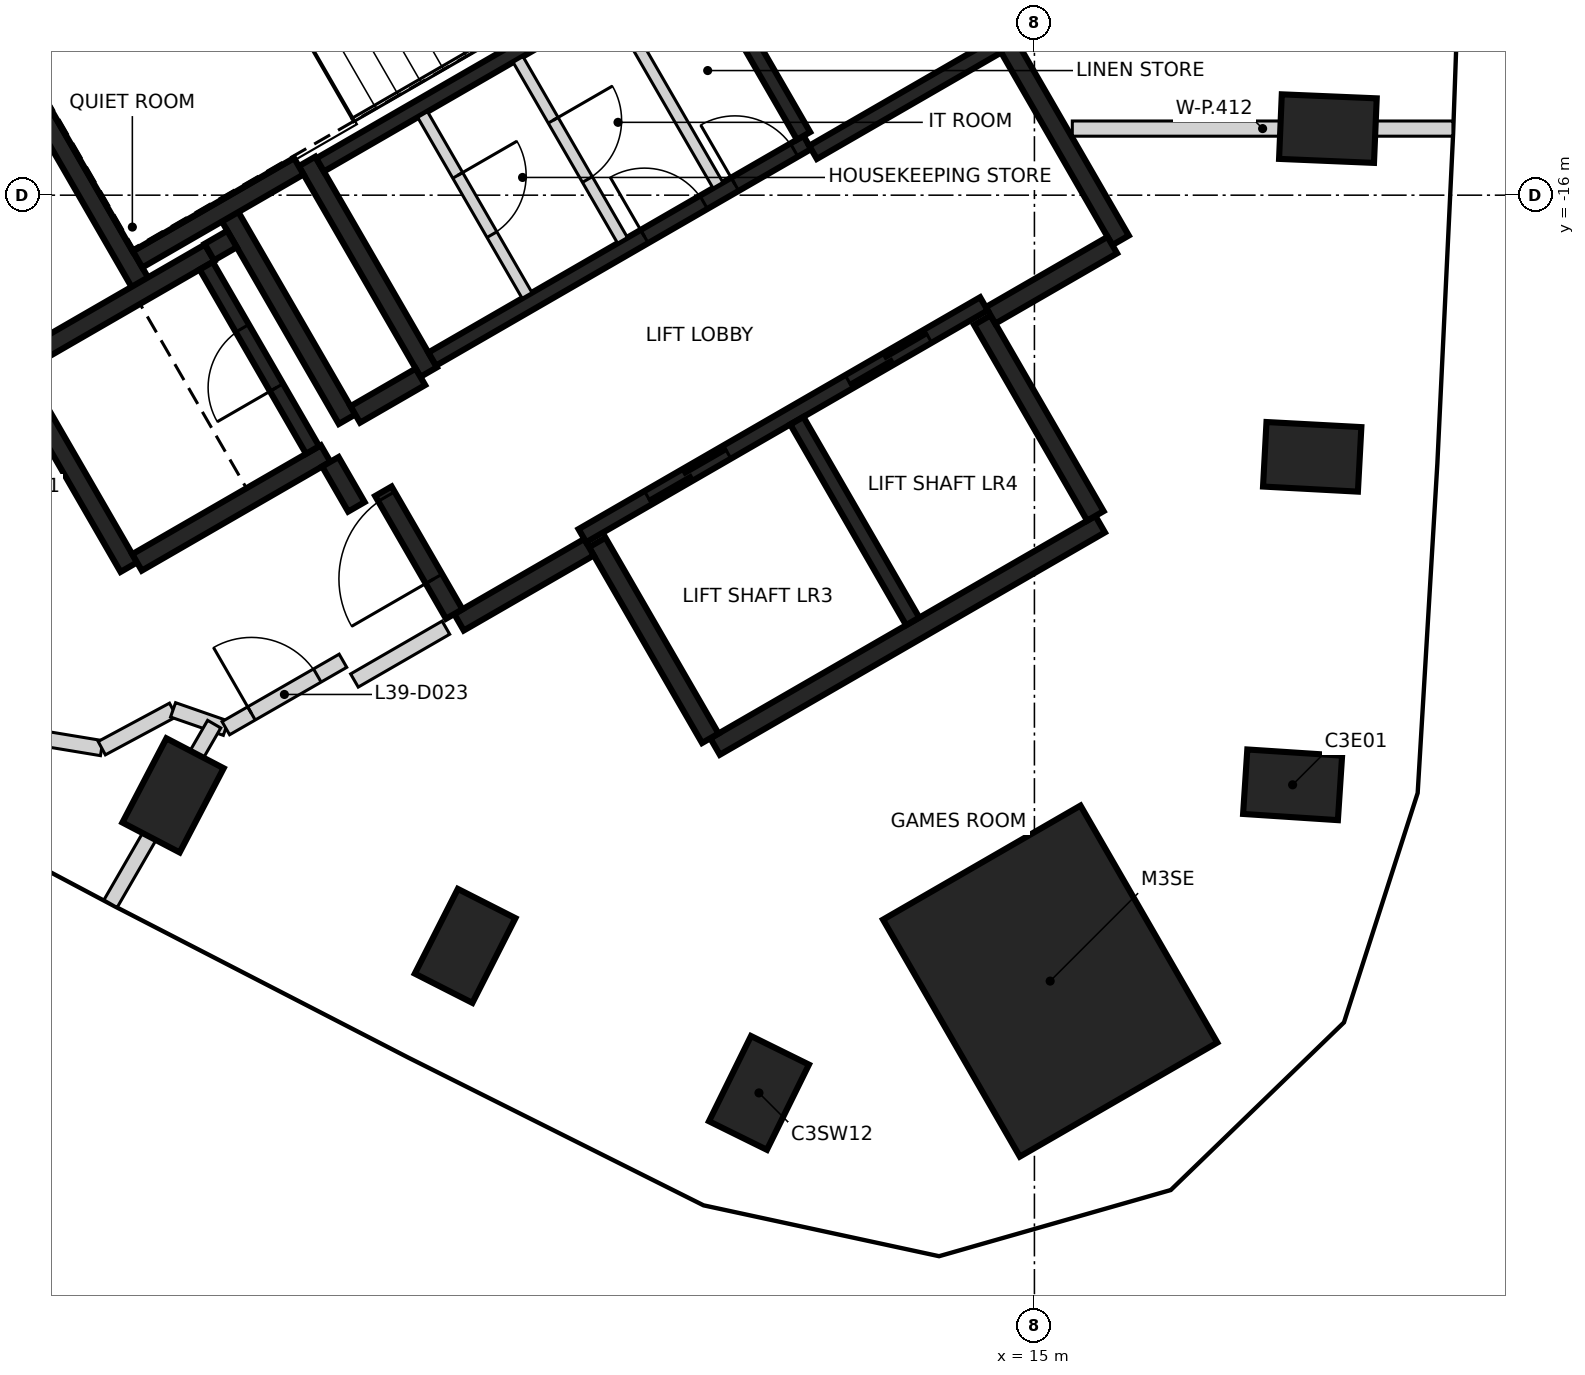
"""IFC4 building model, lengths in metres.
Left out: names, types, materials, properties, quantities, classifications, styles, units other than length and angle.
Written with IfcOpenShell. Run it as: python <this file> out.ifc"""

import sys

from ifc_helpers import new_model, si_unit, direction, frame, frame_2d, origin, origin_2d, place, context, subcontext, project, spatial, rectangle, extrude, element, fill, save


model = new_model("IFC4")
c1 = context("Model", 3, precision=1e-05, world=origin(), true_north=direction((0.0, 1.0)))
c2 = subcontext(c1, "Body", "Model", "MODEL_VIEW")
j1 = project(units=[si_unit("LENGTHUNIT", "METRE"), si_unit("PLANEANGLEUNIT", "RADIAN")], contexts=[c1])
p1 = place(None, origin())
s1 = spatial("IfcSite", under=j1, at=p1, CompositionType="ELEMENT")
p2 = place(p1, origin())
s2 = spatial("IfcBuilding", under=s1, at=p2, CompositionType="ELEMENT")
p3 = place(p2, frame((0.0, 0.0, 157.6)))
s3 = spatial("IfcBuildingStorey", under=s2, at=p3, CompositionType="ELEMENT", Elevation=157.6)
for number, where, z_axis, x_axis in (
    (1, (18.397, -23.757, -0.4), (0.0, 0.0, 1.0), (-0.998, 0.065, 0.0)),
    (2, (18.655, -19.442, -0.4), (0.0, 0.0, 1.0), (-0.999, 0.054, 0.0)),
    (3, (18.861, -15.124, -0.4), (0.0, 0.0, 1.0), (-0.999, 0.042, 0.0)),
    (4, (3.667, -23.896, -0.4), (0.0, 0.0, 1.0), (0.463, 0.886, 0.0)),
    (5, (7.51, -25.876, -0.4), (0.0, 0.0, 1.0), (0.453, 0.892, 0.0)),
    (6, (11.376, -27.811, -0.4), (0.0, 0.0, 1.0), (0.442, 0.897, 0.0)),
):
    element("IfcColumn", number, at=place(p3, frame(where, z_axis=z_axis, x_axis=x_axis)), inside=s3, PredefinedType="COLUMN", context=c2, shape_type="SweptSolid", body=[
        extrude(rectangle(XDim=1.25, YDim=0.85, at=origin_2d()), origin(), (0.0, 0.0, 1.0), 3.6),
    ])
p4 = place(p3, frame((15.207, -26.34, -0.4), z_axis=(0.0, 0.0, 1.0), x_axis=(-0.5, 0.866025403784, 0.0)))
e7 = element("IfcColumn", 7, at=p4, inside=s3, PredefinedType="COLUMN", context=c2, shape_type="SweptSolid", body=[
    extrude(rectangle(XDim=3.6, YDim=3.0, at=origin_2d()), origin(), (0.0, 0.0, 1.0), 3.6),
])
p5 = place(p3, frame((13.008, -11.181, 0.0), z_axis=(0.0, 0.0, 1.0), x_axis=(0.500004234368, -0.866022959057, 0.0)))
e8 = element("IfcWall", 8, at=p5, inside=s3, PredefinedType="SHEAR", context=c2, shape_type="SweptSolid", body=[
    extrude(rectangle(XDim=6.25, YDim=0.25, at=frame_2d((3.125, 0.0))), origin(), (0.0, 0.0, 1.0), 3.2),
])
p6 = place(p3, frame((15.865, -20.328, 0.0), z_axis=(0.0, 0.0, 1.0), x_axis=(-0.86602852612, -0.499994591916, 0.0)))
e9 = element("IfcWall", 9, at=p6, inside=s3, PredefinedType="SHEAR", context=c2, shape_type="SweptSolid", body=[
    extrude(rectangle(XDim=5.85, YDim=0.25, at=frame_2d((2.925, 0.0))), origin(), (0.0, 0.0, 1.0), 3.2),
])
p7 = place(p3, frame((3.235, -17.153, 0.0), z_axis=(0.0, 0.0, 1.0), x_axis=(-0.500008851346, 0.866020293397, 0.0)))
e10 = element("IfcWall", 10, at=p7, inside=s3, PredefinedType="SHEAR", context=c2, shape_type="SweptSolid", body=[
    extrude(rectangle(XDim=5.51, YDim=0.25, at=frame_2d((2.755, 0.0))), origin(), (0.0, 0.0, 1.0), 3.2),
])
p8 = place(p3, frame((7.031, -18.327, 0.0), z_axis=(0.0, 0.0, 1.0), x_axis=(-0.499971222258, 0.866042017984, 0.0)))
e11 = element("IfcWall", 11, at=p8, inside=s3, PredefinedType="SHEAR", context=c2, shape_type="SweptSolid", body=[
    extrude(rectangle(XDim=3.2, YDim=0.25, at=frame_2d((1.6, 0.0))), origin(), (0.0, 0.0, 1.0), 3.2),
])
for number, where, z_axis, x_axis in (
    (12, (14.315, -17.644, 0.0), (0.0, 0.0, 1.0), (0.5, -0.866, 0.0)),
    (13, (10.736, -23.145, 0.0), (0.0, 0.0, 1.0), (-0.5, 0.866, 0.0)),
):
    element("IfcWall", number, at=place(p3, frame(where, z_axis=z_axis, x_axis=x_axis)), inside=s3, PredefinedType="SHEAR", context=c2, shape_type="SweptSolid", body=[
        extrude(rectangle(XDim=2.974, YDim=0.25, at=frame_2d((1.487, 0.0))), origin(), (0.0, 0.0, 1.0), 3.2),
    ])
p9 = place(p3, frame((3.085, -20.894, 0.0), z_axis=(0.0, 0.0, 1.0), x_axis=(-0.499978833458, 0.866037623948, 0.0)))
e14 = element("IfcWall", 14, at=p9, inside=s3, PredefinedType="SHEAR", context=c2, shape_type="SweptSolid", body=[
    extrude(rectangle(XDim=3.05, YDim=0.25, at=frame_2d((1.525, 0.0))), origin(), (0.0, 0.0, 1.0), 3.2),
])
p10 = place(p3, frame((1.669, -18.19, 0.0), z_axis=(0.0, 0.0, 1.0), x_axis=(0.866042235819, 0.499970844928, 0.0)))
e15 = element("IfcWall", 15, at=p10, inside=s3, PredefinedType="SHEAR", context=c2, shape_type="SweptSolid", body=[
    extrude(rectangle(XDim=2.865, YDim=0.25, at=frame_2d((1.432, 0.0))), origin(), (0.0, 0.0, 1.0), 3.2),
])
p11 = place(p3, frame((5.675, -19.399, 0.0), z_axis=(0.0, 0.0, 1.0), x_axis=(-0.866026637627, -0.499997862916, 0.0)))
e16 = element("IfcWall", 16, at=p11, inside=s3, PredefinedType="SHEAR", context=c2, shape_type="SweptSolid", body=[
    extrude(rectangle(XDim=2.865, YDim=0.25, at=frame_2d((1.432, 0.0))), origin(), (0.0, 0.0, 1.0), 3.2),
])
p12 = place(p3, frame((4.414, -16.276, 0.0), z_axis=(0.0, 0.0, 1.0), x_axis=(0.500003324108, -0.866023484601, 0.0)))
e17 = element("IfcWall", 17, at=p12, inside=s3, PredefinedType="SHEAR", context=c2, shape_type="SweptSolid", body=[
    extrude(rectangle(XDim=3.085, YDim=0.25, at=frame_2d((1.542, 0.0))), origin(), (0.0, 0.0, 1.0), 3.2),
])
p13 = place(p3, frame((5.322, -15.619, 0.0), z_axis=(0.0, 0.0, 1.0), x_axis=(-0.866026229868, -0.499998569178, 0.0)))
e18 = element("IfcWall", 18, at=p13, inside=s3, PredefinedType="SHEAR", context=c2, shape_type="SweptSolid", body=[
    extrude(rectangle(XDim=2.449, YDim=0.25, at=frame_2d((1.225, 0.0))), origin(), (0.0, 0.0, 1.0), 3.2),
])
p14 = place(p3, frame((9.14, -20.631, 0.0), z_axis=(0.0, 0.0, 1.0), x_axis=(-0.866043531843, -0.499968599967, 0.0)))
e19 = element("IfcWall", 19, at=p14, inside=s3, PredefinedType="SHEAR", context=c2, shape_type="SweptSolid", body=[
    extrude(rectangle(XDim=1.975, YDim=0.25, at=frame_2d((0.987, 0.0))), origin(), (0.0, 0.0, 1.0), 3.2),
])
p15 = place(p3, frame((16.025, -16.656, 0.0), z_axis=(0.0, 0.0, 1.0), x_axis=(-0.866016279763, -0.500015802937, 0.0)))
e20 = element("IfcWall", 20, at=p15, inside=s3, PredefinedType="SHEAR", context=c2, shape_type="SweptSolid", body=[
    extrude(rectangle(XDim=1.849, YDim=0.25, at=frame_2d((0.925, 0.0))), origin(), (0.0, 0.0, 1.0), 3.2),
])
p16 = place(p3, frame((7.367, -21.51, 0.0), z_axis=(0.0, 0.0, 1.0), x_axis=(-0.499983108224, 0.866035156036, 0.0)))
e21 = element("IfcWall", 21, at=p16, inside=s3, PredefinedType="SHEAR", context=c2, shape_type="SweptSolid", body=[
    extrude(rectangle(XDim=1.865, YDim=0.25, at=frame_2d((0.932, 0.0))), origin(), (0.0, 0.0, 1.0), 3.2),
])
p17 = place(p16, frame((0.535, 0.0, 0.0)))
e22 = element("IfcOpeningElement", 22, at=p17, cuts=e21, PredefinedType="OPENING", context=c2, shape_type="SweptSolid", body=[
    extrude(rectangle(XDim=1.25, YDim=2.1, at=frame_2d((0.625, 1.05))), frame((0.0, 0.135, 0.0), z_axis=(0.0, -1.0, 0.0), x_axis=(1.0, 0.0, 0.0)), (0.0, 0.0, 1.0), 0.27),
])
p18 = place(p3, frame((6.065, -18.885, 0.0), z_axis=(0.0, 0.0, 1.0), x_axis=(0.866017078145, 0.500014420154, 0.0)))
e23 = element("IfcWall", 23, at=p18, inside=s3, PredefinedType="SHEAR", context=c2, shape_type="SweptSolid", body=[
    extrude(rectangle(XDim=0.989, YDim=0.25, at=frame_2d((0.495, 0.0))), origin(), (0.0, 0.0, 1.0), 3.2),
])
p19 = place(p3, frame((6.08, -20.1, 0.0), z_axis=(0.0, 0.0, 1.0), x_axis=(-0.500051773299, 0.865995510393, 0.0)))
e24 = element("IfcWall", 24, at=p19, inside=s3, PredefinedType="SHEAR", context=c2, shape_type="SweptSolid", body=[
    extrude(rectangle(XDim=0.685, YDim=0.25, at=frame_2d((0.342, 0.0))), origin(), (0.0, 0.0, 1.0), 3.2),
])
p20 = place(p3, frame((4.145, -16.749, 0.0), z_axis=(0.0, 0.0, 1.0), x_axis=(0.866185586049, 0.49972245349, 0.0)))
e25 = element("IfcWall", 25, at=p20, inside=s3, PredefinedType="SHEAR", context=c2, shape_type="SweptSolid", body=[
    extrude(rectangle(XDim=0.344, YDim=0.25, at=frame_2d((0.172, 0.0))), origin(), (0.0, 0.0, 1.0), 3.2),
])
p21 = place(p3, frame((9.052, -20.48, 0.0), z_axis=(0.0, 0.0, 1.0), x_axis=(0.866030299012, 0.499991521122, 0.0)))
e26 = element("IfcWall", 26, at=p21, inside=s3, PredefinedType="SHEAR", context=c2, shape_type="SweptSolid", body=[
    extrude(rectangle(XDim=6.1, YDim=0.2, at=frame_2d((3.05, 0.0))), origin(), (0.0, 0.0, 1.0), 3.2),
])
p22 = place(p21, frame((1.0, 0.0, 0.0)))
e27 = element("IfcOpeningElement", 27, at=p22, cuts=e26, PredefinedType="OPENING", context=c2, shape_type="SweptSolid", body=[
    extrude(rectangle(XDim=1.2, YDim=2.1, at=frame_2d((0.6, 1.05))), frame((0.0, 0.11, 0.0), z_axis=(0.0, -1.0, 0.0), x_axis=(1.0, 0.0, 0.0)), (0.0, 0.0, 1.0), 0.22),
])
p23 = place(p21, frame((4.05, 0.0, 0.0)))
e28 = element("IfcOpeningElement", 28, at=p23, cuts=e26, PredefinedType="OPENING", context=c2, shape_type="SweptSolid", body=[
    extrude(rectangle(XDim=1.2, YDim=2.1, at=frame_2d((0.6, 1.05))), frame((0.0, 0.11, 0.0), z_axis=(0.0, -1.0, 0.0), x_axis=(1.0, 0.0, 0.0)), (0.0, 0.0, 1.0), 0.22),
])
p24 = place(p3, frame((10.538, -12.752, 0.0), z_axis=(0.0, 0.0, 1.0), x_axis=(-0.866038630372, -0.499977090179, 0.0)))
e29 = element("IfcWall", 29, at=p24, inside=s3, PredefinedType="SHEAR", context=c2, shape_type="SweptSolid", body=[
    extrude(rectangle(XDim=5.699, YDim=0.2, at=frame_2d((2.85, 0.0))), origin(), (0.0, 0.0, 1.0), 3.2),
])
p25 = place(p3, frame((7.077, -18.156, 0.0), z_axis=(0.0, 0.0, 1.0), x_axis=(0.866038630372, 0.499977090179, 0.0)))
e30 = element("IfcWall", 30, at=p25, inside=s3, PredefinedType="SHEAR", context=c2, shape_type="SweptSolid", body=[
    extrude(rectangle(XDim=5.699, YDim=0.2, at=frame_2d((2.85, 0.0))), origin(), (0.0, 0.0, 1.0), 3.2),
])
p26 = place(p25, frame((3.224, 0.0, 0.0)))
e31 = element("IfcOpeningElement", 31, at=p26, cuts=e30, PredefinedType="OPENING", context=c2, shape_type="SweptSolid", body=[
    extrude(rectangle(XDim=0.9, YDim=2.1, at=frame_2d((0.45, 1.05))), frame((0.0, 0.11, 0.0), z_axis=(0.0, -1.0, 0.0), x_axis=(1.0, 0.0, 0.0)), (0.0, 0.0, 1.0), 0.22),
])
p27 = place(p25, frame((4.599, 0.0, 0.0)))
e32 = element("IfcOpeningElement", 32, at=p27, cuts=e30, PredefinedType="OPENING", context=c2, shape_type="SweptSolid", body=[
    extrude(rectangle(XDim=0.9, YDim=2.1, at=frame_2d((0.45, 1.05))), frame((0.0, 0.11, 0.0), z_axis=(0.0, -1.0, 0.0), x_axis=(1.0, 0.0, 0.0)), (0.0, 0.0, 1.0), 0.22),
])
p28 = place(p3, frame((11.875, -18.967, 0.0), z_axis=(0.0, 0.0, 1.0), x_axis=(0.49998131003, -0.866036194175, 0.0)))
e33 = element("IfcWall", 33, at=p28, inside=s3, PredefinedType="SHEAR", context=c2, shape_type="SweptSolid", body=[
    extrude(rectangle(XDim=3.048, YDim=0.2, at=frame_2d((1.524, 0.0))), origin(), (0.0, 0.0, 1.0), 3.2),
])
p29 = place(p3, frame((5.503, -19.352, 0.0), z_axis=(0.0, 0.0, 1.0), x_axis=(-0.499986818241, 0.866033014143, 0.0)))
e34 = element("IfcWall", 34, at=p29, inside=s3, PredefinedType="SHEAR", context=c2, shape_type="SweptSolid", body=[
    extrude(rectangle(XDim=2.798, YDim=0.2, at=frame_2d((1.399, 0.0))), origin(), (0.0, 0.0, 1.0), 3.2),
])
p30 = place(p29, frame((0.949, 0.0, 0.0)))
e35 = element("IfcOpeningElement", 35, at=p30, cuts=e34, PredefinedType="OPENING", context=c2, shape_type="SweptSolid", body=[
    extrude(rectangle(XDim=0.9, YDim=2.1, at=frame_2d((0.45, 1.05))), frame((0.0, 0.11, 0.0), z_axis=(0.0, -1.0, 0.0), x_axis=(1.0, 0.0, 0.0)), (0.0, 0.0, 1.0), 0.22),
])
p31 = place(p3, frame((11.963, -15.22, 0.0), z_axis=(0.0, 0.0, 1.0), x_axis=(-0.500034990121, 0.866005201286, 0.0)))
e36 = element("IfcWall", 36, at=p31, inside=s3, PredefinedType="SHEAR", context=c2, shape_type="SweptSolid", body=[
    extrude(rectangle(XDim=2.75, YDim=0.2, at=frame_2d((1.375, 0.0))), origin(), (0.0, 0.0, 1.0), 3.2),
])
p32 = place(p3, frame((14.512, -14.037, 0.0), z_axis=(0.0, 0.0, 1.0), x_axis=(-0.866044696403, -0.499966582715, 0.0)))
e37 = element("IfcWall", 37, at=p32, inside=s3, PredefinedType="SHEAR", context=c2, shape_type="SweptSolid", body=[
    extrude(rectangle(XDim=2.799, YDim=0.2, at=frame_2d((1.399, 0.0))), origin(), (0.0, 0.0, 1.0), 3.2),
])
p33 = place(p3, frame((8.207, -14.214, 0.0), z_axis=(0.0, 0.0, 1.0), x_axis=(0.50002746344, -0.86600954718, 0.0)))
e38 = element("IfcWall", 38, at=p33, inside=s3, PredefinedType="PARTITIONING", context=c2, shape_type="SweptSolid", body=[
    extrude(rectangle(XDim=2.748, YDim=0.15, at=frame_2d((1.374, 0.0))), origin(), (0.0, 0.0, 1.0), 3.2),
])
p34 = place(p33, frame((0.924, 0.0, 0.0)))
e39 = element("IfcOpeningElement", 39, at=p34, cuts=e38, PredefinedType="OPENING", context=c2, shape_type="SweptSolid", body=[
    extrude(rectangle(XDim=0.9, YDim=2.1, at=frame_2d((0.45, 1.05))), frame((0.0, 0.085, 0.0), z_axis=(0.0, -1.0, 0.0), x_axis=(1.0, 0.0, 0.0)), (0.0, 0.0, 1.0), 0.17),
])
p35 = place(p3, frame((9.462, -13.489, 0.0), z_axis=(0.0, 0.0, 1.0), x_axis=(0.499988999718, -0.866031754707, 0.0)))
e40 = element("IfcWall", 40, at=p35, inside=s3, PredefinedType="PARTITIONING", context=c2, shape_type="SweptSolid", body=[
    extrude(rectangle(XDim=2.749, YDim=0.15, at=frame_2d((1.374, 0.0))), origin(), (0.0, 0.0, 1.0), 3.2),
])
p36 = place(p3, frame((6.951, -14.939, 0.0), z_axis=(0.0, 0.0, 1.0), x_axis=(0.499988999718, -0.866031754707, 0.0)))
e41 = element("IfcWall", 41, at=p36, inside=s3, PredefinedType="PARTITIONING", context=c2, shape_type="SweptSolid", body=[
    extrude(rectangle(XDim=2.749, YDim=0.15, at=frame_2d((1.374, 0.0))), origin(), (0.0, 0.0, 1.0), 3.2),
])
p37 = place(p36, frame((0.924, 0.0, 0.0)))
e42 = element("IfcOpeningElement", 42, at=p37, cuts=e41, PredefinedType="OPENING", context=c2, shape_type="SweptSolid", body=[
    extrude(rectangle(XDim=0.9, YDim=2.1, at=frame_2d((0.45, 1.05))), frame((0.0, 0.085, 0.0), z_axis=(0.0, -1.0, 0.0), x_axis=(1.0, 0.0, 0.0)), (0.0, 0.0, 1.0), 0.17),
])
p38 = place(p3, frame((1.584, -23.086, 0.0), z_axis=(0.0, 0.0, 1.0), x_axis=(0.986654221629, -0.162829502674, 0.0)))
e43 = element("IfcWall", 43, at=p38, inside=s3, PredefinedType="PARTITIONING", context=c2, shape_type="SweptSolid", body=[
    extrude(rectangle(XDim=1.16, YDim=0.2, at=frame_2d((0.58, 0.0))), origin(), (0.0, 0.0, 1.0), 2.3),
])
p39 = place(p3, frame((2.73, -23.275, 0.0), z_axis=(0.0, 0.0, 1.0), x_axis=(0.880927165636, 0.473251866182, 0.0)))
e44 = element("IfcWall", 44, at=p39, inside=s3, PredefinedType="PARTITIONING", context=c2, shape_type="SweptSolid", body=[
    extrude(rectangle(XDim=1.065, YDim=0.2, at=frame_2d((0.532, 0.0))), origin(), (0.0, 0.0, 1.0), 3.2),
])
p40 = place(p3, frame((3.668, -22.771, 0.0), z_axis=(0.0, 0.0, 1.0), x_axis=(0.944447470761, -0.328662402738, 0.0)))
e45 = element("IfcWall", 45, at=p40, inside=s3, PredefinedType="PARTITIONING", context=c2, shape_type="SweptSolid", body=[
    extrude(rectangle(XDim=0.735, YDim=0.2, at=frame_2d((0.367, 0.0))), origin(), (0.0, 0.0, 1.0), 3.2),
])
p41 = place(p3, frame((4.362, -23.012, 0.0), z_axis=(0.0, 0.0, 1.0), x_axis=(0.866692617793, 0.49884256661, 0.0)))
e46 = element("IfcWall", 46, at=p41, inside=s3, PredefinedType="PARTITIONING", context=c2, shape_type="SweptSolid", body=[
    extrude(rectangle(XDim=1.778, YDim=0.2, at=frame_2d((0.889, 0.0))), origin(), (0.0, 0.0, 1.0), 3.2),
])
p42 = place(p41, frame((0.389, 0.0, 0.0)))
e47 = element("IfcOpeningElement", 47, at=p42, cuts=e46, PredefinedType="OPENING", context=c2, shape_type="SweptSolid", body=[
    extrude(rectangle(XDim=1.0, YDim=2.1, at=frame_2d((0.5, 1.05))), frame((0.0, 0.11, 0.0), z_axis=(0.0, -1.0, 0.0), x_axis=(1.0, 0.0, 0.0)), (0.0, 0.0, 1.0), 0.22),
])
p43 = place(p3, frame((6.054, -22.385, 0.0), z_axis=(0.0, 0.0, 1.0), x_axis=(0.86593101922, 0.500163443238, 0.0)))
e48 = element("IfcWall", 48, at=p43, inside=s3, PredefinedType="PARTITIONING", context=c2, shape_type="SweptSolid", body=[
    extrude(rectangle(XDim=1.39, YDim=0.2, at=frame_2d((0.695, 0.0))), origin(), (0.0, 0.0, 1.0), 3.2),
])
p44 = place(p3, frame((2.845, -25.321, 0.0), z_axis=(0.0, 0.0, 1.0), x_axis=(0.499942002849, 0.866058885866, 0.0)))
e49 = element("IfcWall", 49, at=p44, inside=s3, PredefinedType="PARTITIONING", context=c2, shape_type="SweptSolid", body=[
    extrude(rectangle(XDim=2.727, YDim=0.2, at=frame_2d((1.364, 0.0))), origin(), (0.0, 0.0, 1.0), 3.2),
])
p45 = place(p3, frame((15.498, -15.124, 0.0), z_axis=(0.0, 0.0, 1.0), x_axis=(1.0, 0.0, 0.0)))
e50 = element("IfcWall", 50, at=p45, inside=s3, PredefinedType="PARTITIONING", context=c2, shape_type="SweptSolid", body=[
    extrude(rectangle(XDim=5.008, YDim=0.2, at=frame_2d((2.504, 0.0))), origin(), (0.0, 0.0, 1.0), 3.2),
])
p46 = place(p22, origin())
e51 = element("IfcDoor", 51, at=p46, inside=s3, OperationType="DOUBLE_DOOR_SLIDING", PredefinedType="DOOR", context=c2, shape_type="SweptSolid", body=[
    extrude(rectangle(XDim=1.2, YDim=2.1, at=frame_2d((0.6, 1.05))), frame((0.0, 0.025, 0.0), z_axis=(0.0, -1.0, 0.0), x_axis=(1.0, 0.0, 0.0)), (0.0, 0.0, 1.0), 0.05),
])
fill(e27, e51)
p47 = place(p23, origin())
e52 = element("IfcDoor", 52, at=p47, inside=s3, OperationType="DOUBLE_DOOR_SLIDING", PredefinedType="DOOR", context=c2, shape_type="SweptSolid", body=[
    extrude(rectangle(XDim=1.2, YDim=2.1, at=frame_2d((0.6, 1.05))), frame((0.0, 0.025, 0.0), z_axis=(0.0, -1.0, 0.0), x_axis=(1.0, 0.0, 0.0)), (0.0, 0.0, 1.0), 0.05),
])
fill(e28, e52)
p48 = place(p17, origin())
e53 = element("IfcDoor", 53, at=p48, inside=s3, OperationType="SINGLE_SWING_LEFT", PredefinedType="DOOR", context=c2, shape_type="SweptSolid", body=[
    extrude(rectangle(XDim=1.25, YDim=2.1, at=frame_2d((0.625, 1.05))), frame((0.0, 0.025, 0.0), z_axis=(0.0, -1.0, 0.0), x_axis=(1.0, 0.0, 0.0)), (0.0, 0.0, 1.0), 0.05),
])
fill(e22, e53)
p49 = place(p26, origin())
e54 = element("IfcDoor", 54, at=p49, inside=s3, OperationType="SINGLE_SWING_LEFT", PredefinedType="DOOR", context=c2, shape_type="SweptSolid", body=[
    extrude(rectangle(XDim=0.9, YDim=2.1, at=frame_2d((0.45, 1.05))), frame((0.0, 0.025, 0.0), z_axis=(0.0, -1.0, 0.0), x_axis=(1.0, 0.0, 0.0)), (0.0, 0.0, 1.0), 0.05),
])
fill(e31, e54)
p50 = place(p27, origin())
e55 = element("IfcDoor", 55, at=p50, inside=s3, OperationType="SINGLE_SWING_RIGHT", PredefinedType="DOOR", context=c2, shape_type="SweptSolid", body=[
    extrude(rectangle(XDim=0.9, YDim=2.1, at=frame_2d((0.45, 1.05))), frame((0.0, 0.025, 0.0), z_axis=(0.0, -1.0, 0.0), x_axis=(1.0, 0.0, 0.0)), (0.0, 0.0, 1.0), 0.05),
])
fill(e32, e55)
p51 = place(p30, origin())
e56 = element("IfcDoor", 56, at=p51, inside=s3, OperationType="SINGLE_SWING_LEFT", PredefinedType="DOOR", context=c2, shape_type="SweptSolid", body=[
    extrude(rectangle(XDim=0.9, YDim=2.1, at=frame_2d((0.45, 1.05))), frame((0.0, 0.025, 0.0), z_axis=(0.0, -1.0, 0.0), x_axis=(1.0, 0.0, 0.0)), (0.0, 0.0, 1.0), 0.05),
])
fill(e35, e56)
p52 = place(p34, origin())
e57 = element("IfcDoor", 57, at=p52, inside=s3, OperationType="SINGLE_SWING_RIGHT", PredefinedType="DOOR", context=c2, shape_type="SweptSolid", body=[
    extrude(rectangle(XDim=0.9, YDim=2.1, at=frame_2d((0.45, 1.05))), frame((0.0, 0.025, 0.0), z_axis=(0.0, -1.0, 0.0), x_axis=(1.0, 0.0, 0.0)), (0.0, 0.0, 1.0), 0.05),
])
fill(e39, e57)
p53 = place(p37, origin())
e58 = element("IfcDoor", 58, at=p53, inside=s3, OperationType="SINGLE_SWING_LEFT", PredefinedType="DOOR", context=c2, shape_type="SweptSolid", body=[
    extrude(rectangle(XDim=0.9, YDim=2.1, at=frame_2d((0.45, 1.05))), frame((0.0, 0.025, 0.0), z_axis=(0.0, -1.0, 0.0), x_axis=(1.0, 0.0, 0.0)), (0.0, 0.0, 1.0), 0.05),
])
fill(e42, e58)
p54 = place(p42, frame((1.0, 0.0, 0.0), z_axis=(0.0, 0.0, 1.0), x_axis=(-1.0, 0.0, 0.0)))
e59 = element("IfcDoor", 59, at=p54, inside=s3, OperationType="SINGLE_SWING_LEFT", PredefinedType="DOOR", context=c2, shape_type="SweptSolid", body=[
    extrude(rectangle(XDim=1.0, YDim=2.1, at=frame_2d((0.5, 1.05))), frame((0.0, 0.025, 0.0), z_axis=(0.0, -1.0, 0.0), x_axis=(1.0, 0.0, 0.0)), (0.0, 0.0, 1.0), 0.05),
])
fill(e47, e59)
save(model, sys.argv[1])
